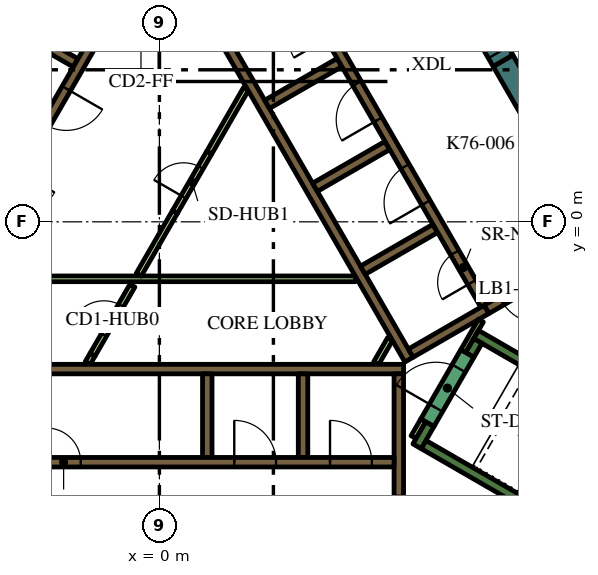
"""IFC4 building model, lengths in metres.
Left out: names, types, materials, properties, quantities, classifications, styles, units other than length and angle.
Written with IfcOpenShell. Run it as: python <this file> out.ifc"""

import sys

from ifc_helpers import new_model, si_unit, direction, frame, frame_2d, origin, place, context, subcontext, project, spatial, rectangle, extrude, element, fill, save


model = new_model("IFC4")
c1 = context("Model", 3, precision=1e-05, world=origin(), true_north=direction((0.0, 1.0)))
c2 = subcontext(c1, "Body", "Model", "MODEL_VIEW")
j1 = project(units=[si_unit("LENGTHUNIT", "METRE"), si_unit("PLANEANGLEUNIT", "RADIAN")], contexts=[c1])
p1 = place(None, origin())
s1 = spatial("IfcSite", under=j1, at=p1, CompositionType="ELEMENT")
p2 = place(p1, origin())
s2 = spatial("IfcBuilding", under=s1, at=p2, CompositionType="ELEMENT")
p3 = place(p2, frame((0.0, 0.0, 327.6)))
s3 = spatial("IfcBuildingStorey", under=s2, at=p3, CompositionType="ELEMENT", Elevation=327.6)
p4 = place(p3, frame((9.042, 4.239, 0.0), z_axis=(0.0, 0.0, 1.0), x_axis=(0.500005785455, -0.866022063525, 0.0)))
e1 = element("IfcWall", 1, at=p4, inside=s3, PredefinedType="SOLIDWALL", context=c2, shape_type="SweptSolid", body=[
    extrude(rectangle(XDim=12.406, YDim=0.6, at=frame_2d((6.203, 0.0))), origin(), (0.0, 0.0, 1.0), 4.2),
])
p5 = place(p3, frame((12.84, -9.261, 0.0), z_axis=(0.0, 0.0, 1.0), x_axis=(-0.866013990052, 0.500019768644, 0.0)))
e2 = element("IfcWall", 2, at=p5, inside=s3, PredefinedType="SOLIDWALL", context=c2, shape_type="SweptSolid", body=[
    extrude(rectangle(XDim=6.8, YDim=0.25, at=frame_2d((3.4, 0.0))), origin(), (0.0, 0.0, 1.0), 4.2),
])
p6 = place(p3, frame((6.78, -5.906, 0.0), z_axis=(0.0, 0.0, 1.0), x_axis=(0.500223362819, 0.865896406789, 0.0)))
e3 = element("IfcWall", 3, at=p6, inside=s3, PredefinedType="SOLIDWALL", context=c2, shape_type="SweptSolid", body=[
    extrude(rectangle(XDim=0.675, YDim=0.25, at=frame_2d((0.337, 0.0))), origin(), (0.0, 0.0, 1.0), 4.2),
])
p7 = place(p3, frame((8.334, -2.964, 0.0), z_axis=(0.0, 0.0, 1.0), x_axis=(0.866016039709, -0.500016218704, 0.0)))
e4 = element("IfcWall", 4, at=p7, inside=s3, PredefinedType="SOLIDWALL", context=c2, shape_type="SweptSolid", body=[
    extrude(rectangle(XDim=7.05, YDim=0.25, at=frame_2d((3.525, 0.0))), origin(), (0.0, 0.0, 1.0), 4.2),
])
p8 = place(p3, frame((8.168, -3.503, 0.0), z_axis=(0.0, 0.0, 1.0), x_axis=(0.49972245349, 0.866185586049, 0.0)))
e5 = element("IfcWall", 5, at=p8, inside=s3, PredefinedType="SOLIDWALL", context=c2, shape_type="SweptSolid", body=[
    extrude(rectangle(XDim=0.425, YDim=0.25, at=frame_2d((0.212, 0.0))), origin(), (0.0, 0.0, 1.0), 4.2),
])
p9 = place(p3, frame((-5.545, -3.875, 0.0), z_axis=(0.0, 0.0, 1.0), x_axis=(1.0, 0.0, 0.0)))
e6 = element("IfcWall", 6, at=p9, inside=s3, PredefinedType="SOLIDWALL", context=c2, shape_type="SweptSolid", body=[
    extrude(rectangle(XDim=11.97, YDim=0.25, at=frame_2d((5.985, 0.0))), origin(), (0.0, 0.0, 1.0), 4.2),
])
p10 = place(p3, frame((6.3, -7.24, 0.0), z_axis=(0.0, 0.0, 1.0), x_axis=(0.0, 1.0, 0.0)))
e7 = element("IfcWall", 7, at=p10, inside=s3, PredefinedType="SOLIDWALL", context=c2, shape_type="SweptSolid", body=[
    extrude(rectangle(XDim=3.24, YDim=0.25, at=frame_2d((1.62, 0.0))), origin(), (0.0, 0.0, 1.0), 4.2),
])
for number, where, z_axis, x_axis in (
    (8, (3.78, -4.0, 0.0), (0.0, 0.0, 1.0), (0.0, -1.0, 0.0)),
    (9, (1.26, -4.0, 0.0), (0.0, 0.0, 1.0), (0.0, -1.0, 0.0)),
):
    element("IfcWall", number, at=place(p3, frame(where, z_axis=z_axis, x_axis=x_axis)), inside=s3, PredefinedType="SOLIDWALL", context=c2, shape_type="SweptSolid", body=[
        extrude(rectangle(XDim=2.2, YDim=0.25, at=frame_2d((1.1, 0.0))), origin(), (0.0, 0.0, 1.0), 4.2),
    ])
p11 = place(p3, frame((6.568, -3.627, 0.0), z_axis=(0.0, 0.0, 1.0), x_axis=(-0.499999455981, 0.866025717874, 0.0)))
e10 = element("IfcWall", 10, at=p11, inside=s3, PredefinedType="SOLIDWALL", context=c2, shape_type="SweptSolid", body=[
    extrude(rectangle(XDim=11.978, YDim=0.25, at=frame_2d((5.989, 0.0))), origin(), (0.0, 0.0, 1.0), 4.2),
])
for number, where, z_axis, x_axis in (
    (11, (2.834, 3.091, 0.0), (0.0, 0.0, 1.0), (0.866, 0.5, 0.0)),
    (12, (4.094, 0.909, 0.0), (0.0, 0.0, 1.0), (0.866, 0.5, 0.0)),
    (13, (5.354, -1.274, 0.0), (0.0, 0.0, 1.0), (0.866, 0.5, 0.0)),
):
    element("IfcWall", number, at=place(p3, frame(where, z_axis=z_axis, x_axis=x_axis)), inside=s3, PredefinedType="SOLIDWALL", context=c2, shape_type="SweptSolid", body=[
        extrude(rectangle(XDim=2.2, YDim=0.25, at=frame_2d((1.1, 0.0))), origin(), (0.0, 0.0, 1.0), 4.2),
    ])
p12 = place(p3, frame((6.614, -3.456, 0.0), z_axis=(0.0, 0.0, 1.0), x_axis=(0.866025089694, 0.500000544019, 0.0)))
e14 = element("IfcWall", 14, at=p12, inside=s3, PredefinedType="SOLIDWALL", context=c2, shape_type="SweptSolid", body=[
    extrude(rectangle(XDim=2.305, YDim=0.25, at=frame_2d((1.153, 0.0))), origin(), (0.0, 0.0, 1.0), 4.2),
])
p13 = place(p3, frame((-8.06, -1.311, 0.0), z_axis=(0.0, 0.0, 1.0), x_axis=(0.50000273126, 0.866023826885, 0.0)))
e15 = element("IfcWall", 15, at=p13, inside=s3, PredefinedType="SOLIDWALL", context=c2, shape_type="SweptSolid", body=[
    extrude(rectangle(XDim=10.33, YDim=0.25, at=frame_2d((5.165, 0.0))), origin(), (0.0, 0.0, 1.0), 4.2),
])
p14 = place(p3, frame((-2.204, 4.182, 0.0), z_axis=(0.0, 0.0, 1.0), x_axis=(-0.866008176907, 0.50002983664, 0.0)))
e16 = element("IfcWall", 16, at=p14, inside=s3, PredefinedType="SOLIDWALL", context=c2, shape_type="SweptSolid", body=[
    extrude(rectangle(XDim=2.2, YDim=0.25, at=frame_2d((1.1, 0.0))), origin(), (0.0, 0.0, 1.0), 4.2),
])
p15 = place(p3, frame((6.945, -5.222, 0.0), z_axis=(0.0, 0.0, 1.0), x_axis=(-0.499818422106, -0.866130212453, 0.0)))
e17 = element("IfcWall", 17, at=p15, inside=s3, PredefinedType="PARTITIONING", context=c2, shape_type="SweptSolid", body=[
    extrude(rectangle(XDim=0.514, YDim=0.15, at=frame_2d((0.257, 0.0))), origin(), (0.0, 0.0, 1.0), 3.45),
])
p16 = place(p3, frame((8.459, -2.599, 0.0), z_axis=(0.0, 0.0, 1.0), x_axis=(-0.500041054325, -0.866001699761, 0.0)))
e18 = element("IfcWall", 18, at=p16, inside=s3, PredefinedType="PARTITIONING", context=c2, shape_type="SweptSolid", body=[
    extrude(rectangle(XDim=0.929, YDim=0.15, at=frame_2d((0.464, 0.0))), origin(), (0.0, 0.0, 1.0), 4.2),
])
p17 = place(p3, frame((5.705, -3.718, 0.0), z_axis=(0.0, 0.0, 1.0), x_axis=(0.499962090823, 0.866047289552, 0.0)))
e19 = element("IfcWall", 19, at=p17, inside=s3, PredefinedType="PARTITIONING", context=c2, shape_type="SweptSolid", body=[
    extrude(rectangle(XDim=0.735, YDim=0.15, at=frame_2d((0.367, 0.0))), origin(), (0.0, 0.0, 1.0), 3.45),
])
p18 = place(p3, frame((-4.2, -1.5, 0.0), z_axis=(0.0, 0.0, 1.0), x_axis=(1.0, 0.0, 0.0)))
e20 = element("IfcWall", 20, at=p18, inside=s3, PredefinedType="PARTITIONING", context=c2, shape_type="SweptSolid", body=[
    extrude(rectangle(XDim=9.359, YDim=0.15, at=frame_2d((4.68, 0.0))), origin(), (0.0, 0.0, 1.0), 3.45),
])
p19 = place(p3, frame((-0.544, -1.393, 0.0), z_axis=(0.0, 0.0, 1.0), x_axis=(0.499928740635, 0.866066541489, 0.0)))
e21 = element("IfcWall", 21, at=p19, inside=s3, PredefinedType="PARTITIONING", context=c2, shape_type="SweptSolid", body=[
    extrude(rectangle(XDim=1.912, YDim=0.15, at=frame_2d((0.956, 0.0))), origin(), (0.0, 0.0, 1.0), 3.45),
])
p20 = place(p3, frame((1.312, 1.822, 0.0), z_axis=(0.0, 0.0, 1.0), x_axis=(0.500003549559, 0.866023354436, 0.0)))
e22 = element("IfcWall", 22, at=p20, inside=s3, PredefinedType="PARTITIONING", context=c2, shape_type="SweptSolid", body=[
    extrude(rectangle(XDim=1.93, YDim=0.15, at=frame_2d((0.965, 0.0))), origin(), (0.0, 0.0, 1.0), 3.45),
])
p21 = place(p3, frame((-1.887, -3.718, 0.0), z_axis=(0.0, 0.0, 1.0), x_axis=(0.500165633897, 0.865929753888, 0.0)))
e23 = element("IfcWall", 23, at=p21, inside=s3, PredefinedType="PARTITIONING", context=c2, shape_type="SweptSolid", body=[
    extrude(rectangle(XDim=0.254, YDim=0.15, at=frame_2d((0.127, 0.0))), origin(), (0.0, 0.0, 1.0), 3.45),
])
p22 = place(p3, frame((-6.175, -6.325, 0.0), z_axis=(0.0, 0.0, 1.0), x_axis=(1.0, 0.0, 0.0)))
e24 = element("IfcWall", 24, at=p22, inside=s3, PredefinedType="SOLIDWALL", context=c2, shape_type="SweptSolid", body=[
    extrude(rectangle(XDim=12.35, YDim=0.25, at=frame_2d((6.175, 0.0))), origin(), (0.0, 0.0, 1.0), 4.2),
])
p23 = place(p22, frame((3.205, 0.0, 0.0)))
e25 = element("IfcOpeningElement", 25, at=p23, cuts=e24, PredefinedType="OPENING", context=c2, shape_type="SweptSolid", body=[
    extrude(rectangle(XDim=0.9, YDim=2.1, at=frame_2d((0.45, 1.05))), frame((0.0, 0.135, 0.0), z_axis=(0.0, -1.0, 0.0), x_axis=(1.0, 0.0, 0.0)), (0.0, 0.0, 1.0), 0.27),
])
p24 = place(p22, frame((8.145, 0.0, 0.0)))
e26 = element("IfcOpeningElement", 26, at=p24, cuts=e24, PredefinedType="OPENING", context=c2, shape_type="SweptSolid", body=[
    extrude(rectangle(XDim=1.1, YDim=2.1, at=frame_2d((0.55, 1.05))), frame((0.0, 0.135, 0.0), z_axis=(0.0, -1.0, 0.0), x_axis=(1.0, 0.0, 0.0)), (0.0, 0.0, 1.0), 0.27),
])
p25 = place(p22, frame((10.665, 0.0, 0.0)))
e27 = element("IfcOpeningElement", 27, at=p25, cuts=e24, PredefinedType="OPENING", context=c2, shape_type="SweptSolid", body=[
    extrude(rectangle(XDim=1.1, YDim=2.1, at=frame_2d((0.55, 1.05))), frame((0.0, 0.135, 0.0), z_axis=(0.0, -1.0, 0.0), x_axis=(1.0, 0.0, 0.0)), (0.0, 0.0, 1.0), 0.27),
])
p26 = place(p3, frame((8.565, -2.185, 0.0), z_axis=(0.0, 0.0, 1.0), x_axis=(-0.499997954832, 0.866026584559, 0.0)))
e28 = element("IfcWall", 28, at=p26, inside=s3, PredefinedType="SOLIDWALL", context=c2, shape_type="SweptSolid", body=[
    extrude(rectangle(XDim=12.35, YDim=0.25, at=frame_2d((6.175, 0.0))), origin(), (0.0, 0.0, 1.0), 4.2),
])
p27 = place(p26, frame((0.685, 0.0, 0.0)))
e29 = element("IfcOpeningElement", 29, at=p27, cuts=e28, PredefinedType="OPENING", context=c2, shape_type="SweptSolid", body=[
    extrude(rectangle(XDim=0.9, YDim=2.1, at=frame_2d((0.45, 1.05))), frame((0.0, 0.135, 0.0), z_axis=(0.0, -1.0, 0.0), x_axis=(1.0, 0.0, 0.0)), (0.0, 0.0, 1.0), 0.27),
])
p28 = place(p26, frame((3.105, 0.0, 0.0)))
e30 = element("IfcOpeningElement", 30, at=p28, cuts=e28, PredefinedType="OPENING", context=c2, shape_type="SweptSolid", body=[
    extrude(rectangle(XDim=1.1, YDim=2.1, at=frame_2d((0.55, 1.05))), frame((0.0, 0.135, 0.0), z_axis=(0.0, -1.0, 0.0), x_axis=(1.0, 0.0, 0.0)), (0.0, 0.0, 1.0), 0.27),
])
p29 = place(p26, frame((5.625, 0.0, 0.0)))
e31 = element("IfcOpeningElement", 31, at=p29, cuts=e28, PredefinedType="OPENING", context=c2, shape_type="SweptSolid", body=[
    extrude(rectangle(XDim=1.1, YDim=2.1, at=frame_2d((0.55, 1.05))), frame((0.0, 0.135, 0.0), z_axis=(0.0, -1.0, 0.0), x_axis=(1.0, 0.0, 0.0)), (0.0, 0.0, 1.0), 0.27),
])
p30 = place(p26, frame((8.145, 0.0, 0.0)))
e32 = element("IfcOpeningElement", 32, at=p30, cuts=e28, PredefinedType="OPENING", context=c2, shape_type="SweptSolid", body=[
    extrude(rectangle(XDim=1.1, YDim=2.1, at=frame_2d((0.55, 1.05))), frame((0.0, 0.135, 0.0), z_axis=(0.0, -1.0, 0.0), x_axis=(1.0, 0.0, 0.0)), (0.0, 0.0, 1.0), 0.27),
])
p31 = place(p26, frame((10.665, 0.0, 0.0)))
e33 = element("IfcOpeningElement", 33, at=p31, cuts=e28, PredefinedType="OPENING", context=c2, shape_type="SweptSolid", body=[
    extrude(rectangle(XDim=1.1, YDim=2.1, at=frame_2d((0.55, 1.05))), frame((0.0, 0.135, 0.0), z_axis=(0.0, -1.0, 0.0), x_axis=(1.0, 0.0, 0.0)), (0.0, 0.0, 1.0), 0.27),
])
p32 = place(p3, frame((-0.898, 6.194, 0.0), z_axis=(0.0, 0.0, 1.0), x_axis=(-0.499996202215, -0.866027596426, 0.0)))
e34 = element("IfcWall", 34, at=p32, inside=s3, PredefinedType="SOLIDWALL", context=c2, shape_type="SweptSolid", body=[
    extrude(rectangle(XDim=9.83, YDim=0.25, at=frame_2d((4.915, 0.0))), origin(), (0.0, 0.0, 1.0), 4.2),
])
p33 = place(p32, frame((0.585, 0.0, 0.0)))
e35 = element("IfcOpeningElement", 35, at=p33, cuts=e34, PredefinedType="OPENING", context=c2, shape_type="SweptSolid", body=[
    extrude(rectangle(XDim=1.1, YDim=2.1, at=frame_2d((0.55, 1.05))), frame((0.0, 0.135, 0.0), z_axis=(0.0, -1.0, 0.0), x_axis=(1.0, 0.0, 0.0)), (0.0, 0.0, 1.0), 0.27),
])
p34 = place(p32, frame((3.105, 0.0, 0.0)))
e36 = element("IfcOpeningElement", 36, at=p34, cuts=e34, PredefinedType="OPENING", context=c2, shape_type="SweptSolid", body=[
    extrude(rectangle(XDim=1.1, YDim=2.1, at=frame_2d((0.55, 1.05))), frame((0.0, 0.135, 0.0), z_axis=(0.0, -1.0, 0.0), x_axis=(1.0, 0.0, 0.0)), (0.0, 0.0, 1.0), 0.27),
])
p35 = place(p32, frame((5.625, 0.0, 0.0)))
e37 = element("IfcOpeningElement", 37, at=p35, cuts=e34, PredefinedType="OPENING", context=c2, shape_type="SweptSolid", body=[
    extrude(rectangle(XDim=1.1, YDim=2.1, at=frame_2d((0.55, 1.05))), frame((0.0, 0.135, 0.0), z_axis=(0.0, -1.0, 0.0), x_axis=(1.0, 0.0, 0.0)), (0.0, 0.0, 1.0), 0.27),
])
p36 = place(p32, frame((8.145, 0.0, 0.0)))
e38 = element("IfcOpeningElement", 38, at=p36, cuts=e34, PredefinedType="OPENING", context=c2, shape_type="SweptSolid", body=[
    extrude(rectangle(XDim=1.1, YDim=2.1, at=frame_2d((0.55, 1.05))), frame((0.0, 0.135, 0.0), z_axis=(0.0, -1.0, 0.0), x_axis=(1.0, 0.0, 0.0)), (0.0, 0.0, 1.0), 0.27),
])
p37 = place(p3, frame((7.053, -5.284, 0.0), z_axis=(0.0, 0.0, 1.0), x_axis=(0.500078061341, 0.865980330357, 0.0)))
e39 = element("IfcWall", 39, at=p37, inside=s3, PredefinedType="SOLIDWALL", context=c2, shape_type="SweptSolid", body=[
    extrude(rectangle(XDim=2.1, YDim=0.4, at=frame_2d((1.05, 0.0))), origin(), (0.0, 0.0, 1.0), 4.2),
])
p38 = place(p37, frame((0.45, 0.0, 0.0)))
e40 = element("IfcOpeningElement", 40, at=p38, cuts=e39, PredefinedType="OPENING", context=c2, shape_type="SweptSolid", body=[
    extrude(rectangle(XDim=1.2, YDim=2.1, at=frame_2d((0.6, 1.05))), frame((0.0, 0.21, 0.0), z_axis=(0.0, -1.0, 0.0), x_axis=(1.0, 0.0, 0.0)), (0.0, 0.0, 1.0), 0.42),
])
p39 = place(p3, frame((-1.76, -3.498, 0.0), z_axis=(0.0, 0.0, 1.0), x_axis=(0.499977374825, 0.866038466041, 0.0)))
e41 = element("IfcWall", 41, at=p39, inside=s3, PredefinedType="PARTITIONING", context=c2, shape_type="SweptSolid", body=[
    extrude(rectangle(XDim=2.1, YDim=0.15, at=frame_2d((1.05, 0.0))), origin(), (0.0, 0.0, 1.0), 3.45),
])
p40 = place(p39, frame((0.6, 0.0, 0.0)))
e42 = element("IfcOpeningElement", 42, at=p40, cuts=e41, PredefinedType="OPENING", context=c2, shape_type="SweptSolid", body=[
    extrude(rectangle(XDim=0.9, YDim=2.1, at=frame_2d((0.45, 1.05))), frame((0.0, 0.085, 0.0), z_axis=(0.0, -1.0, 0.0), x_axis=(1.0, 0.0, 0.0)), (0.0, 0.0, 1.0), 0.17),
])
p41 = place(p3, frame((10.429, -1.253, 0.0), z_axis=(0.0, 0.0, 1.0), x_axis=(-0.866009402589, -0.500027713859, 0.0)))
e43 = element("IfcWall", 43, at=p41, inside=s3, PredefinedType="SOLIDWALL", context=c2, shape_type="SweptSolid", body=[
    extrude(rectangle(XDim=2.1, YDim=0.25, at=frame_2d((1.05, 0.0))), origin(), (0.0, 0.0, 1.0), 4.2),
])
p42 = place(p41, frame((0.45, 0.0, 0.0)))
e44 = element("IfcOpeningElement", 44, at=p42, cuts=e43, PredefinedType="OPENING", context=c2, shape_type="SweptSolid", body=[
    extrude(rectangle(XDim=1.2, YDim=2.1, at=frame_2d((0.6, 1.05))), frame((0.0, 0.135, 0.0), z_axis=(0.0, -1.0, 0.0), x_axis=(1.0, 0.0, 0.0)), (0.0, 0.0, 1.0), 0.27),
])
p43 = place(p3, frame((8.192, 5.711, 0.0), z_axis=(0.0, 0.0, 1.0), x_axis=(0.500062241894, -0.865989465428, 0.0)))
e45 = element("IfcWall", 45, at=p43, inside=s3, PredefinedType="SOLIDWALL", context=c2, shape_type="SweptSolid", body=[
    extrude(rectangle(XDim=1.7, YDim=0.6, at=frame_2d((0.85, 0.0))), origin(), (0.0, 0.0, 1.0), 4.2),
])
p44 = place(p43, frame((0.25, 0.0, 0.0)))
e46 = element("IfcOpeningElement", 46, at=p44, cuts=e45, PredefinedType="OPENING", context=c2, shape_type="SweptSolid", body=[
    extrude(rectangle(XDim=1.2, YDim=2.1, at=frame_2d((0.6, 1.05))), frame((0.0, 0.31, 0.0), z_axis=(0.0, -1.0, 0.0), x_axis=(1.0, 0.0, 0.0)), (0.0, 0.0, 1.0), 0.62),
])
p45 = place(p3, frame((0.412, 0.263, 0.0), z_axis=(0.0, 0.0, 1.0), x_axis=(0.500062916607, 0.865989075817, 0.0)))
e47 = element("IfcWall", 47, at=p45, inside=s3, PredefinedType="PARTITIONING", context=c2, shape_type="SweptSolid", body=[
    extrude(rectangle(XDim=1.8, YDim=0.15, at=frame_2d((0.9, 0.0))), origin(), (0.0, 0.0, 1.0), 3.45),
])
p46 = place(p45, frame((0.45, 0.0, 0.0)))
e48 = element("IfcOpeningElement", 48, at=p46, cuts=e47, PredefinedType="OPENING", context=c2, shape_type="SweptSolid", body=[
    extrude(rectangle(XDim=0.9, YDim=2.1, at=frame_2d((0.45, 1.05))), frame((0.0, 0.085, 0.0), z_axis=(0.0, -1.0, 0.0), x_axis=(1.0, 0.0, 0.0)), (0.0, 0.0, 1.0), 0.17),
])
p47 = place(p3, frame((18.181, -1.79, 0.0), z_axis=(0.0, 0.0, 1.0), x_axis=(-0.500002158106, 0.866024157798, 0.0)))
e49 = element("IfcWall", 49, at=p47, inside=s3, PredefinedType="SOLIDWALL", context=c2, shape_type="SweptSolid", body=[
    extrude(rectangle(XDim=21.282, YDim=0.3, at=frame_2d((10.641, 0.0))), origin(), (0.0, 0.0, 1.0), 3.45),
])
p48 = place(p23, origin())
e50 = element("IfcDoor", 50, at=p48, inside=s3, OperationType="SINGLE_SWING_LEFT", PredefinedType="DOOR", context=c2, shape_type="SweptSolid", body=[
    extrude(rectangle(XDim=0.9, YDim=2.1, at=frame_2d((0.45, 1.05))), frame((0.0, 0.025, 0.0), z_axis=(0.0, -1.0, 0.0), x_axis=(1.0, 0.0, 0.0)), (0.0, 0.0, 1.0), 0.05),
])
fill(e25, e50)
p49 = place(p24, origin())
e51 = element("IfcDoor", 51, at=p49, inside=s3, OperationType="DOUBLE_DOOR_SLIDING", PredefinedType="DOOR", context=c2, shape_type="SweptSolid", body=[
    extrude(rectangle(XDim=1.1, YDim=2.1, at=frame_2d((0.55, 1.05))), frame((0.0, 0.025, 0.0), z_axis=(0.0, -1.0, 0.0), x_axis=(1.0, 0.0, 0.0)), (0.0, 0.0, 1.0), 0.05),
])
fill(e26, e51)
p50 = place(p25, origin())
e52 = element("IfcDoor", 52, at=p50, inside=s3, OperationType="DOUBLE_DOOR_SLIDING", PredefinedType="DOOR", context=c2, shape_type="SweptSolid", body=[
    extrude(rectangle(XDim=1.1, YDim=2.1, at=frame_2d((0.55, 1.05))), frame((0.0, 0.025, 0.0), z_axis=(0.0, -1.0, 0.0), x_axis=(1.0, 0.0, 0.0)), (0.0, 0.0, 1.0), 0.05),
])
fill(e27, e52)
p51 = place(p27, origin())
e53 = element("IfcDoor", 53, at=p51, inside=s3, OperationType="SINGLE_SWING_LEFT", PredefinedType="DOOR", context=c2, shape_type="SweptSolid", body=[
    extrude(rectangle(XDim=0.9, YDim=2.1, at=frame_2d((0.45, 1.05))), frame((0.0, 0.025, 0.0), z_axis=(0.0, -1.0, 0.0), x_axis=(1.0, 0.0, 0.0)), (0.0, 0.0, 1.0), 0.05),
])
fill(e29, e53)
p52 = place(p28, origin())
e54 = element("IfcDoor", 54, at=p52, inside=s3, OperationType="DOUBLE_DOOR_SLIDING", PredefinedType="DOOR", context=c2, shape_type="SweptSolid", body=[
    extrude(rectangle(XDim=1.1, YDim=2.1, at=frame_2d((0.55, 1.05))), frame((0.0, 0.025, 0.0), z_axis=(0.0, -1.0, 0.0), x_axis=(1.0, 0.0, 0.0)), (0.0, 0.0, 1.0), 0.05),
])
fill(e30, e54)
p53 = place(p29, origin())
e55 = element("IfcDoor", 55, at=p53, inside=s3, OperationType="DOUBLE_DOOR_SLIDING", PredefinedType="DOOR", context=c2, shape_type="SweptSolid", body=[
    extrude(rectangle(XDim=1.1, YDim=2.1, at=frame_2d((0.55, 1.05))), frame((0.0, 0.025, 0.0), z_axis=(0.0, -1.0, 0.0), x_axis=(1.0, 0.0, 0.0)), (0.0, 0.0, 1.0), 0.05),
])
fill(e31, e55)
p54 = place(p34, origin())
e56 = element("IfcDoor", 56, at=p54, inside=s3, OperationType="DOUBLE_DOOR_SLIDING", PredefinedType="DOOR", context=c2, shape_type="SweptSolid", body=[
    extrude(rectangle(XDim=1.1, YDim=2.1, at=frame_2d((0.55, 1.05))), frame((0.0, 0.025, 0.0), z_axis=(0.0, -1.0, 0.0), x_axis=(1.0, 0.0, 0.0)), (0.0, 0.0, 1.0), 0.05),
])
fill(e36, e56)
p55 = place(p38, origin())
e57 = element("IfcDoor", 57, at=p55, inside=s3, OperationType="SINGLE_SWING_LEFT", PredefinedType="DOOR", context=c2, shape_type="SweptSolid", body=[
    extrude(rectangle(XDim=1.2, YDim=2.1, at=frame_2d((0.6, 1.05))), frame((0.0, 0.025, 0.0), z_axis=(0.0, -1.0, 0.0), x_axis=(1.0, 0.0, 0.0)), (0.0, 0.0, 1.0), 0.05),
])
fill(e40, e57)
p56 = place(p40, origin())
e58 = element("IfcDoor", 58, at=p56, inside=s3, OperationType="SINGLE_SWING_LEFT", PredefinedType="DOOR", context=c2, shape_type="SweptSolid", body=[
    extrude(rectangle(XDim=0.9, YDim=2.1, at=frame_2d((0.45, 1.05))), frame((0.0, 0.025, 0.0), z_axis=(0.0, -1.0, 0.0), x_axis=(1.0, 0.0, 0.0)), (0.0, 0.0, 1.0), 0.05),
])
fill(e42, e58)
p57 = place(p42, origin())
e59 = element("IfcDoor", 59, at=p57, inside=s3, OperationType="SINGLE_SWING_LEFT", PredefinedType="DOOR", context=c2, shape_type="SweptSolid", body=[
    extrude(rectangle(XDim=1.2, YDim=2.1, at=frame_2d((0.6, 1.05))), frame((0.0, 0.025, 0.0), z_axis=(0.0, -1.0, 0.0), x_axis=(1.0, 0.0, 0.0)), (0.0, 0.0, 1.0), 0.05),
])
fill(e44, e59)
p58 = place(p44, origin())
e60 = element("IfcDoor", 60, at=p58, inside=s3, OperationType="SINGLE_SWING_LEFT", PredefinedType="DOOR", context=c2, shape_type="SweptSolid", body=[
    extrude(rectangle(XDim=1.2, YDim=2.1, at=frame_2d((0.6, 1.05))), frame((0.0, 0.025, 0.0), z_axis=(0.0, -1.0, 0.0), x_axis=(1.0, 0.0, 0.0)), (0.0, 0.0, 1.0), 0.05),
])
fill(e46, e60)
p59 = place(p46, origin())
e61 = element("IfcDoor", 61, at=p59, inside=s3, OperationType="SINGLE_SWING_LEFT", PredefinedType="DOOR", context=c2, shape_type="SweptSolid", body=[
    extrude(rectangle(XDim=0.9, YDim=2.1, at=frame_2d((0.45, 1.05))), frame((0.0, 0.025, 0.0), z_axis=(0.0, -1.0, 0.0), x_axis=(1.0, 0.0, 0.0)), (0.0, 0.0, 1.0), 0.05),
])
fill(e48, e61)
save(model, sys.argv[1])
